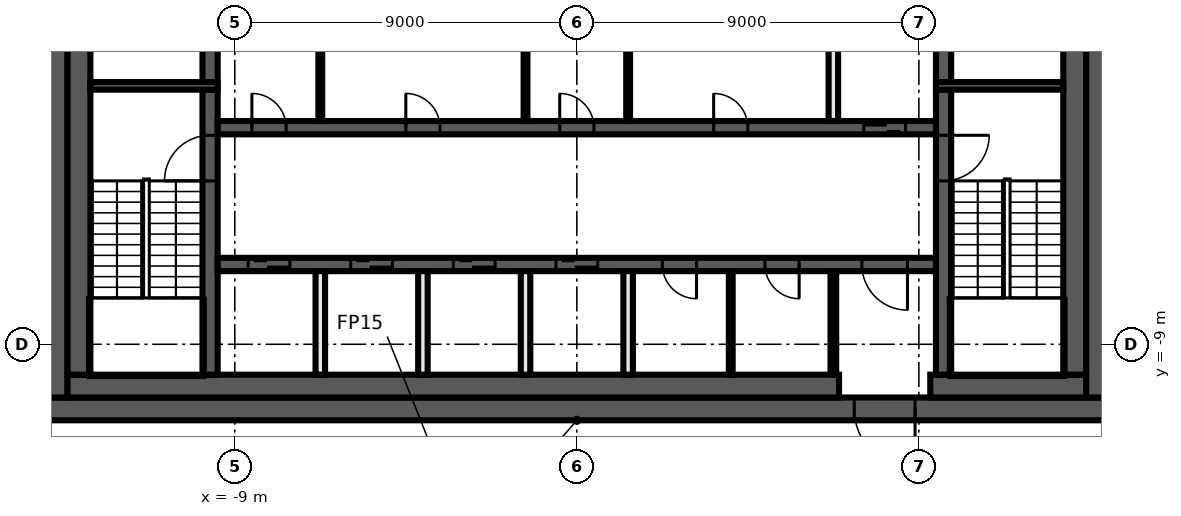
"""IFC4 building model, lengths in metres.
Left out: names, types, materials, properties, quantities, classifications, styles, units other than length and angle.
Written with IfcOpenShell. Run it as: python <this file> out.ifc"""

import sys

from ifc_helpers import new_model, si_unit, direction, frame, frame_2d, origin, place, context, subcontext, project, spatial, rectangle, extrude, element, fill, save


model = new_model("IFC4")
c1 = context("Model", 3, precision=1e-05, world=origin(), true_north=direction((0.0, 1.0)))
c2 = subcontext(c1, "Body", "Model", "MODEL_VIEW")
j1 = project(units=[si_unit("LENGTHUNIT", "METRE"), si_unit("PLANEANGLEUNIT", "RADIAN")], contexts=[c1])
p1 = place(None, origin())
s1 = spatial("IfcSite", under=j1, at=p1, CompositionType="ELEMENT")
p2 = place(p1, origin())
s2 = spatial("IfcBuilding", under=s1, at=p2, CompositionType="ELEMENT")
p3 = place(p2, frame((0.0, 0.0, 340.4)))
s3 = spatial("IfcBuildingStorey", under=s2, at=p3, CompositionType="ELEMENT", Elevation=340.4)
p4 = place(p3, frame((14.0, -10.7, 0.0), z_axis=(0.0, 0.0, 1.0), x_axis=(-1.0, 0.0, 0.0)))
e1 = element("IfcWall", 1, at=p4, inside=s3, PredefinedType="SHEAR", context=c2, shape_type="SweptSolid", body=[
    extrude(rectangle(XDim=28.0, YDim=0.6, at=frame_2d((14.0, 0.0))), origin(), (0.0, 0.0, 1.0), 3.82),
])
p5 = place(p4, frame((5.1, 0.0, 0.0)))
e2 = element("IfcOpeningElement", 2, at=p5, cuts=e1, PredefinedType="OPENING", context=c2, shape_type="SweptSolid", body=[
    extrude(rectangle(XDim=1.6, YDim=2.1, at=frame_2d((0.8, 1.05))), frame((0.0, 0.31, 0.0), z_axis=(0.0, -1.0, 0.0), x_axis=(1.0, 0.0, 0.0)), (0.0, 0.0, 1.0), 0.62),
])
for number, where, z_axis, x_axis in (
    (3, (13.7, 10.4, 0.0), (0.0, 0.0, 1.0), (0.0, -1.0, 0.0)),
    (4, (-13.7, -10.4, 0.0), (0.0, 0.0, 1.0), (0.0, 1.0, 0.0)),
):
    element("IfcWall", number, at=place(p3, frame(where, z_axis=z_axis, x_axis=x_axis)), inside=s3, PredefinedType="SHEAR", context=c2, shape_type="SweptSolid", body=[
        extrude(rectangle(XDim=20.8, YDim=0.6, at=frame_2d((10.4, 0.0))), origin(), (0.0, 0.0, 1.0), 3.82),
    ])
p6 = place(p3, frame((13.4, -10.1, 0.0), z_axis=(0.0, 0.0, 1.0), x_axis=(-1.0, 0.0, 0.0)))
e5 = element("IfcWall", 5, at=p6, inside=s3, PredefinedType="SHEAR", context=c2, shape_type="SweptSolid", body=[
    extrude(rectangle(XDim=4.1, YDim=0.6, at=frame_2d((2.05, 0.0))), origin(), (0.0, 0.0, 1.0), 3.82),
])
p7 = place(p3, frame((6.9, -10.1, 0.0), z_axis=(0.0, 0.0, 1.0), x_axis=(-1.0, 0.0, 0.0)))
e6 = element("IfcWall", 6, at=p7, inside=s3, PredefinedType="SHEAR", context=c2, shape_type="SweptSolid", body=[
    extrude(rectangle(XDim=20.3, YDim=0.6, at=frame_2d((10.15, 0.0))), origin(), (0.0, 0.0, 1.0), 3.82),
])
for number, where, z_axis, x_axis in (
    (7, (13.1, 9.8, 0.0), (0.0, 0.0, 1.0), (0.0, -1.0, 0.0)),
    (8, (-13.1, -9.8, 0.0), (0.0, 0.0, 1.0), (0.0, 1.0, 0.0)),
):
    element("IfcWall", number, at=place(p3, frame(where, z_axis=z_axis, x_axis=x_axis)), inside=s3, PredefinedType="SHEAR", context=c2, shape_type="SweptSolid", body=[
        extrude(rectangle(XDim=19.6, YDim=0.6, at=frame_2d((9.8, 0.0))), origin(), (0.0, 0.0, 1.0), 3.82),
    ])
p8 = place(p3, frame((9.65, -2.3, 0.0), z_axis=(0.0, 0.0, 1.0), x_axis=(0.0, -1.0, 0.0)))
e9 = element("IfcWall", 9, at=p8, inside=s3, PredefinedType="SHEAR", context=c2, shape_type="SweptSolid", body=[
    extrude(rectangle(XDim=7.5, YDim=0.4, at=frame_2d((3.75, 0.0))), origin(), (0.0, 0.0, 1.0), 3.82),
])
p9 = place(p8, frame((1.2, 0.0, 0.0)))
e10 = element("IfcOpeningElement", 10, at=p9, cuts=e9, PredefinedType="OPENING", context=c2, shape_type="SweptSolid", body=[
    extrude(rectangle(XDim=1.2, YDim=2.1, at=frame_2d((0.6, 1.05))), frame((0.0, 0.21, 0.0), z_axis=(0.0, -1.0, 0.0), x_axis=(1.0, 0.0, 0.0)), (0.0, 0.0, 1.0), 0.42),
])
p10 = place(p3, frame((9.65, 2.1, 0.0), z_axis=(0.0, 0.0, 1.0), x_axis=(0.0, -1.0, 0.0)))
e11 = element("IfcWall", 11, at=p10, inside=s3, PredefinedType="SHEAR", context=c2, shape_type="SweptSolid", body=[
    extrude(rectangle(XDim=4.2, YDim=0.4, at=frame_2d((2.1, 0.0))), origin(), (0.0, 0.0, 1.0), 3.82),
])
p11 = place(p10, frame((0.15, 0.0, 0.0)))
e12 = element("IfcOpeningElement", 12, at=p11, cuts=e11, PredefinedType="OPENING", context=c2, shape_type="SweptSolid", body=[
    extrude(rectangle(XDim=0.9, YDim=2.1, at=frame_2d((0.45, 1.05))), frame((0.0, 0.21, 0.0), z_axis=(0.0, -1.0, 0.0), x_axis=(1.0, 0.0, 0.0)), (0.0, 0.0, 1.0), 0.42),
])
p12 = place(p3, frame((-9.65, -9.8, 0.0), z_axis=(0.0, 0.0, 1.0), x_axis=(0.0, 1.0, 0.0)))
e13 = element("IfcWall", 13, at=p12, inside=s3, PredefinedType="SHEAR", context=c2, shape_type="SweptSolid", body=[
    extrude(rectangle(XDim=7.5, YDim=0.4, at=frame_2d((3.75, 0.0))), origin(), (0.0, 0.0, 1.0), 3.82),
])
p13 = place(p12, frame((5.1, 0.0, 0.0)))
e14 = element("IfcOpeningElement", 14, at=p13, cuts=e13, PredefinedType="OPENING", context=c2, shape_type="SweptSolid", body=[
    extrude(rectangle(XDim=1.2, YDim=2.1, at=frame_2d((0.6, 1.05))), frame((0.0, 0.21, 0.0), z_axis=(0.0, -1.0, 0.0), x_axis=(1.0, 0.0, 0.0)), (0.0, 0.0, 1.0), 0.42),
])
p14 = place(p3, frame((-9.65, -2.1, 0.0), z_axis=(0.0, 0.0, 1.0), x_axis=(0.0, 1.0, 0.0)))
e15 = element("IfcWall", 15, at=p14, inside=s3, PredefinedType="SHEAR", context=c2, shape_type="SweptSolid", body=[
    extrude(rectangle(XDim=4.2, YDim=0.4, at=frame_2d((2.1, 0.0))), origin(), (0.0, 0.0, 1.0), 3.82),
])
for number, where, z_axis, x_axis in (
    (16, (9.45, -2.2, 0.0), (0.0, 0.0, 1.0), (1.0, 0.0, 0.0)),
    (17, (-9.45, -2.2, 0.0), (0.0, 0.0, 1.0), (-1.0, 0.0, 0.0)),
):
    element("IfcWall", number, at=place(p3, frame(where, z_axis=z_axis, x_axis=x_axis)), inside=s3, PredefinedType="SHEAR", context=c2, shape_type="SweptSolid", body=[
        extrude(rectangle(XDim=3.35, YDim=0.2, at=frame_2d((1.675, 0.0))), origin(), (0.0, 0.0, 1.0), 3.82),
    ])
p15 = place(p3, frame((-9.45, -3.3, 0.0), z_axis=(0.0, 0.0, 1.0), x_axis=(1.0, 0.0, 0.0)))
e18 = element("IfcWall", 18, at=p15, inside=s3, PredefinedType="SHEAR", context=c2, shape_type="SweptSolid", body=[
    extrude(rectangle(XDim=18.9, YDim=0.35, at=frame_2d((9.45, 0.0))), origin(), (0.0, 0.0, 1.0), 3.82),
])
p16 = place(p15, frame((17.0, 0.0, 0.0)))
e19 = element("IfcOpeningElement", 19, at=p16, cuts=e18, PredefinedType="OPENING", context=c2, shape_type="SweptSolid", body=[
    extrude(rectangle(XDim=1.1, YDim=2.1, at=frame_2d((0.55, 1.05))), frame((0.0, 0.185, 0.0), z_axis=(0.0, -1.0, 0.0), x_axis=(1.0, 0.0, 0.0)), (0.0, 0.0, 1.0), 0.37),
])
p17 = place(p15, frame((0.9, 0.0, 0.0)))
e20 = element("IfcOpeningElement", 20, at=p17, cuts=e18, PredefinedType="OPENING", context=c2, shape_type="SweptSolid", body=[
    extrude(rectangle(XDim=0.9, YDim=2.1, at=frame_2d((0.45, 1.05))), frame((0.0, 0.185, 0.0), z_axis=(0.0, -1.0, 0.0), x_axis=(1.0, 0.0, 0.0)), (0.0, 0.0, 1.0), 0.37),
])
p18 = place(p15, frame((4.95, 0.0, 0.0)))
e21 = element("IfcOpeningElement", 21, at=p18, cuts=e18, PredefinedType="OPENING", context=c2, shape_type="SweptSolid", body=[
    extrude(rectangle(XDim=0.9, YDim=2.1, at=frame_2d((0.45, 1.05))), frame((0.0, 0.185, 0.0), z_axis=(0.0, -1.0, 0.0), x_axis=(1.0, 0.0, 0.0)), (0.0, 0.0, 1.0), 0.37),
])
p19 = place(p15, frame((9.0, 0.0, 0.0)))
e22 = element("IfcOpeningElement", 22, at=p19, cuts=e18, PredefinedType="OPENING", context=c2, shape_type="SweptSolid", body=[
    extrude(rectangle(XDim=0.9, YDim=2.1, at=frame_2d((0.45, 1.05))), frame((0.0, 0.185, 0.0), z_axis=(0.0, -1.0, 0.0), x_axis=(1.0, 0.0, 0.0)), (0.0, 0.0, 1.0), 0.37),
])
p20 = place(p15, frame((13.05, 0.0, 0.0)))
e23 = element("IfcOpeningElement", 23, at=p20, cuts=e18, PredefinedType="OPENING", context=c2, shape_type="SweptSolid", body=[
    extrude(rectangle(XDim=0.9, YDim=2.1, at=frame_2d((0.45, 1.05))), frame((0.0, 0.185, 0.0), z_axis=(0.0, -1.0, 0.0), x_axis=(1.0, 0.0, 0.0)), (0.0, 0.0, 1.0), 0.37),
])
p21 = place(p3, frame((9.45, -6.9, 0.0), z_axis=(0.0, 0.0, 1.0), x_axis=(-1.0, 0.0, 0.0)))
e24 = element("IfcWall", 24, at=p21, inside=s3, PredefinedType="SHEAR", context=c2, shape_type="SweptSolid", body=[
    extrude(rectangle(XDim=18.9, YDim=0.35, at=frame_2d((9.45, 0.0))), origin(), (0.0, 0.0, 1.0), 3.82),
])
p22 = place(p21, frame((17.0, 0.0, 0.0)))
e25 = element("IfcOpeningElement", 25, at=p22, cuts=e24, PredefinedType="OPENING", context=c2, shape_type="SweptSolid", body=[
    extrude(rectangle(XDim=1.1, YDim=2.1, at=frame_2d((0.55, 1.05))), frame((0.0, 0.185, 0.0), z_axis=(0.0, -1.0, 0.0), x_axis=(1.0, 0.0, 0.0)), (0.0, 0.0, 1.0), 0.37),
])
p23 = place(p21, frame((14.3, 0.0, 0.0)))
e26 = element("IfcOpeningElement", 26, at=p23, cuts=e24, PredefinedType="OPENING", context=c2, shape_type="SweptSolid", body=[
    extrude(rectangle(XDim=1.1, YDim=2.1, at=frame_2d((0.55, 1.05))), frame((0.0, 0.185, 0.0), z_axis=(0.0, -1.0, 0.0), x_axis=(1.0, 0.0, 0.0)), (0.0, 0.0, 1.0), 0.37),
])
p24 = place(p21, frame((11.6, 0.0, 0.0)))
e27 = element("IfcOpeningElement", 27, at=p24, cuts=e24, PredefinedType="OPENING", context=c2, shape_type="SweptSolid", body=[
    extrude(rectangle(XDim=1.1, YDim=2.1, at=frame_2d((0.55, 1.05))), frame((0.0, 0.185, 0.0), z_axis=(0.0, -1.0, 0.0), x_axis=(1.0, 0.0, 0.0)), (0.0, 0.0, 1.0), 0.37),
])
p25 = place(p21, frame((8.9, 0.0, 0.0)))
e28 = element("IfcOpeningElement", 28, at=p25, cuts=e24, PredefinedType="OPENING", context=c2, shape_type="SweptSolid", body=[
    extrude(rectangle(XDim=1.1, YDim=2.1, at=frame_2d((0.55, 1.05))), frame((0.0, 0.185, 0.0), z_axis=(0.0, -1.0, 0.0), x_axis=(1.0, 0.0, 0.0)), (0.0, 0.0, 1.0), 0.37),
])
p26 = place(p21, frame((0.75, 0.0, 0.0)))
e29 = element("IfcOpeningElement", 29, at=p26, cuts=e24, PredefinedType="OPENING", context=c2, shape_type="SweptSolid", body=[
    extrude(rectangle(XDim=1.2, YDim=2.1, at=frame_2d((0.6, 1.05))), frame((0.0, 0.185, 0.0), z_axis=(0.0, -1.0, 0.0), x_axis=(1.0, 0.0, 0.0)), (0.0, 0.0, 1.0), 0.37),
])
p27 = place(p21, frame((6.3, 0.0, 0.0)))
e30 = element("IfcOpeningElement", 30, at=p27, cuts=e24, PredefinedType="OPENING", context=c2, shape_type="SweptSolid", body=[
    extrude(rectangle(XDim=0.9, YDim=2.1, at=frame_2d((0.45, 1.05))), frame((0.0, 0.185, 0.0), z_axis=(0.0, -1.0, 0.0), x_axis=(1.0, 0.0, 0.0)), (0.0, 0.0, 1.0), 0.37),
])
p28 = place(p21, frame((3.6, 0.0, 0.0)))
e31 = element("IfcOpeningElement", 31, at=p28, cuts=e24, PredefinedType="OPENING", context=c2, shape_type="SweptSolid", body=[
    extrude(rectangle(XDim=0.9, YDim=2.1, at=frame_2d((0.45, 1.05))), frame((0.0, 0.185, 0.0), z_axis=(0.0, -1.0, 0.0), x_axis=(1.0, 0.0, 0.0)), (0.0, 0.0, 1.0), 0.37),
])
p29 = place(p3, frame((6.75, -9.8, 0.0), z_axis=(0.0, 0.0, 1.0), x_axis=(0.0, 1.0, 0.0)))
e32 = element("IfcWall", 32, at=p29, inside=s3, PredefinedType="PARTITIONING", context=c2, shape_type="SweptSolid", body=[
    extrude(rectangle(XDim=2.725, YDim=0.15, at=frame_2d((1.363, 0.0))), origin(), (0.0, 0.0, 1.0), 3.82),
])
p30 = place(p3, frame((6.75, -3.125, 0.0), z_axis=(0.0, 0.0, 1.0), x_axis=(0.0, 1.0, 0.0)))
e33 = element("IfcWall", 33, at=p30, inside=s3, PredefinedType="SOLIDWALL", context=c2, shape_type="SweptSolid", body=[
    extrude(rectangle(XDim=2.725, YDim=0.25, at=frame_2d((1.363, 0.0))), origin(), (0.0, 0.0, 1.0), 3.82),
])
for number, where, z_axis, x_axis in (
    (34, (4.05, -9.8, 0.0), (0.0, 0.0, 1.0), (0.0, 1.0, 0.0)),
    (35, (1.35, -3.125, 0.0), (0.0, 0.0, 1.0), (0.0, 1.0, 0.0)),
):
    element("IfcWall", number, at=place(p3, frame(where, z_axis=z_axis, x_axis=x_axis)), inside=s3, PredefinedType="PARTITIONING", context=c2, shape_type="SweptSolid", body=[
        extrude(rectangle(XDim=2.725, YDim=0.1, at=frame_2d((1.363, 0.0))), origin(), (0.0, 0.0, 1.0), 3.82),
    ])
p31 = place(p3, frame((1.35, -9.8, 0.0), z_axis=(0.0, 0.0, 1.0), x_axis=(0.0, 1.0, 0.0)))
e36 = element("IfcWall", 36, at=p31, inside=s3, PredefinedType="SOLIDWALL", context=c2, shape_type="SweptSolid", body=[
    extrude(rectangle(XDim=2.725, YDim=0.25, at=frame_2d((1.363, 0.0))), origin(), (0.0, 0.0, 1.0), 3.82),
])
p32 = place(p3, frame((-1.35, -3.125, 0.0), z_axis=(0.0, 0.0, 1.0), x_axis=(0.0, 1.0, 0.0)))
e37 = element("IfcWall", 37, at=p32, inside=s3, PredefinedType="PARTITIONING", context=c2, shape_type="SweptSolid", body=[
    extrude(rectangle(XDim=2.725, YDim=0.1, at=frame_2d((1.363, 0.0))), origin(), (0.0, 0.0, 1.0), 3.82),
])
for number, where, z_axis, x_axis in (
    (38, (-1.35, -9.8, 0.0), (0.0, 0.0, 1.0), (0.0, 1.0, 0.0)),
    (39, (-4.05, -9.8, 0.0), (0.0, 0.0, 1.0), (0.0, 1.0, 0.0)),
):
    element("IfcWall", number, at=place(p3, frame(where, z_axis=z_axis, x_axis=x_axis)), inside=s3, PredefinedType="SOLIDWALL", context=c2, shape_type="SweptSolid", body=[
        extrude(rectangle(XDim=2.725, YDim=0.25, at=frame_2d((1.363, 0.0))), origin(), (0.0, 0.0, 1.0), 3.82),
    ])
p33 = place(p3, frame((-6.75, -3.125, 0.0), z_axis=(0.0, 0.0, 1.0), x_axis=(0.0, 1.0, 0.0)))
e40 = element("IfcWall", 40, at=p33, inside=s3, PredefinedType="PARTITIONING", context=c2, shape_type="SweptSolid", body=[
    extrude(rectangle(XDim=2.725, YDim=0.1, at=frame_2d((1.363, 0.0))), origin(), (0.0, 0.0, 1.0), 3.82),
])
p34 = place(p3, frame((-6.75, -9.8, 0.0), z_axis=(0.0, 0.0, 1.0), x_axis=(0.0, 1.0, 0.0)))
e41 = element("IfcWall", 41, at=p34, inside=s3, PredefinedType="SOLIDWALL", context=c2, shape_type="SweptSolid", body=[
    extrude(rectangle(XDim=2.725, YDim=0.25, at=frame_2d((1.363, 0.0))), origin(), (0.0, 0.0, 1.0), 3.82),
])
p35 = place(p16, origin())
e42 = element("IfcDoor", 42, at=p35, inside=s3, OperationType="DOUBLE_DOOR_SLIDING", PredefinedType="DOOR", context=c2, shape_type="SweptSolid", body=[
    extrude(rectangle(XDim=1.1, YDim=2.1, at=frame_2d((0.55, 1.05))), frame((0.0, 0.025, 0.0), z_axis=(0.0, -1.0, 0.0), x_axis=(1.0, 0.0, 0.0)), (0.0, 0.0, 1.0), 0.05),
])
fill(e19, e42)
p36 = place(p22, origin())
e43 = element("IfcDoor", 43, at=p36, inside=s3, OperationType="DOUBLE_DOOR_SLIDING", PredefinedType="DOOR", context=c2, shape_type="SweptSolid", body=[
    extrude(rectangle(XDim=1.1, YDim=2.1, at=frame_2d((0.55, 1.05))), frame((0.0, 0.025, 0.0), z_axis=(0.0, -1.0, 0.0), x_axis=(1.0, 0.0, 0.0)), (0.0, 0.0, 1.0), 0.05),
])
fill(e25, e43)
p37 = place(p23, origin())
e44 = element("IfcDoor", 44, at=p37, inside=s3, OperationType="DOUBLE_DOOR_SLIDING", PredefinedType="DOOR", context=c2, shape_type="SweptSolid", body=[
    extrude(rectangle(XDim=1.1, YDim=2.1, at=frame_2d((0.55, 1.05))), frame((0.0, 0.025, 0.0), z_axis=(0.0, -1.0, 0.0), x_axis=(1.0, 0.0, 0.0)), (0.0, 0.0, 1.0), 0.05),
])
fill(e26, e44)
p38 = place(p24, origin())
e45 = element("IfcDoor", 45, at=p38, inside=s3, OperationType="DOUBLE_DOOR_SLIDING", PredefinedType="DOOR", context=c2, shape_type="SweptSolid", body=[
    extrude(rectangle(XDim=1.1, YDim=2.1, at=frame_2d((0.55, 1.05))), frame((0.0, 0.025, 0.0), z_axis=(0.0, -1.0, 0.0), x_axis=(1.0, 0.0, 0.0)), (0.0, 0.0, 1.0), 0.05),
])
fill(e27, e45)
p39 = place(p25, origin())
e46 = element("IfcDoor", 46, at=p39, inside=s3, OperationType="DOUBLE_DOOR_SLIDING", PredefinedType="DOOR", context=c2, shape_type="SweptSolid", body=[
    extrude(rectangle(XDim=1.1, YDim=2.1, at=frame_2d((0.55, 1.05))), frame((0.0, 0.025, 0.0), z_axis=(0.0, -1.0, 0.0), x_axis=(1.0, 0.0, 0.0)), (0.0, 0.0, 1.0), 0.05),
])
fill(e28, e46)
p40 = place(p5, origin())
e47 = element("IfcDoor", 47, at=p40, inside=s3, OperationType="DOUBLE_DOOR_SINGLE_SWING", PredefinedType="DOOR", context=c2, shape_type="SweptSolid", body=[
    extrude(rectangle(XDim=1.6, YDim=2.1, at=frame_2d((0.8, 1.05))), frame((0.0, 0.025, 0.0), z_axis=(0.0, -1.0, 0.0), x_axis=(1.0, 0.0, 0.0)), (0.0, 0.0, 1.0), 0.05),
])
fill(e2, e47)
p41 = place(p26, origin())
e48 = element("IfcDoor", 48, at=p41, inside=s3, OperationType="SINGLE_SWING_LEFT", PredefinedType="DOOR", context=c2, shape_type="SweptSolid", body=[
    extrude(rectangle(XDim=1.2, YDim=2.1, at=frame_2d((0.6, 1.05))), frame((0.0, 0.025, 0.0), z_axis=(0.0, -1.0, 0.0), x_axis=(1.0, 0.0, 0.0)), (0.0, 0.0, 1.0), 0.05),
])
fill(e29, e48)
p42 = place(p17, origin())
e49 = element("IfcDoor", 49, at=p42, inside=s3, OperationType="SINGLE_SWING_RIGHT", PredefinedType="DOOR", context=c2, shape_type="SweptSolid", body=[
    extrude(rectangle(XDim=0.9, YDim=2.1, at=frame_2d((0.45, 1.05))), frame((0.0, 0.025, 0.0), z_axis=(0.0, -1.0, 0.0), x_axis=(1.0, 0.0, 0.0)), (0.0, 0.0, 1.0), 0.05),
])
fill(e20, e49)
p43 = place(p18, origin())
e50 = element("IfcDoor", 50, at=p43, inside=s3, OperationType="SINGLE_SWING_LEFT", PredefinedType="DOOR", context=c2, shape_type="SweptSolid", body=[
    extrude(rectangle(XDim=0.9, YDim=2.1, at=frame_2d((0.45, 1.05))), frame((0.0, 0.025, 0.0), z_axis=(0.0, -1.0, 0.0), x_axis=(1.0, 0.0, 0.0)), (0.0, 0.0, 1.0), 0.05),
])
fill(e21, e50)
p44 = place(p19, origin())
e51 = element("IfcDoor", 51, at=p44, inside=s3, OperationType="SINGLE_SWING_RIGHT", PredefinedType="DOOR", context=c2, shape_type="SweptSolid", body=[
    extrude(rectangle(XDim=0.9, YDim=2.1, at=frame_2d((0.45, 1.05))), frame((0.0, 0.025, 0.0), z_axis=(0.0, -1.0, 0.0), x_axis=(1.0, 0.0, 0.0)), (0.0, 0.0, 1.0), 0.05),
])
fill(e22, e51)
p45 = place(p20, origin())
e52 = element("IfcDoor", 52, at=p45, inside=s3, OperationType="SINGLE_SWING_LEFT", PredefinedType="DOOR", context=c2, shape_type="SweptSolid", body=[
    extrude(rectangle(XDim=0.9, YDim=2.1, at=frame_2d((0.45, 1.05))), frame((0.0, 0.025, 0.0), z_axis=(0.0, -1.0, 0.0), x_axis=(1.0, 0.0, 0.0)), (0.0, 0.0, 1.0), 0.05),
])
fill(e23, e52)
p46 = place(p27, origin())
e53 = element("IfcDoor", 53, at=p46, inside=s3, OperationType="SINGLE_SWING_RIGHT", PredefinedType="DOOR", context=c2, shape_type="SweptSolid", body=[
    extrude(rectangle(XDim=0.9, YDim=2.1, at=frame_2d((0.45, 1.05))), frame((0.0, 0.025, 0.0), z_axis=(0.0, -1.0, 0.0), x_axis=(1.0, 0.0, 0.0)), (0.0, 0.0, 1.0), 0.05),
])
fill(e30, e53)
p47 = place(p28, origin())
e54 = element("IfcDoor", 54, at=p47, inside=s3, OperationType="SINGLE_SWING_LEFT", PredefinedType="DOOR", context=c2, shape_type="SweptSolid", body=[
    extrude(rectangle(XDim=0.9, YDim=2.1, at=frame_2d((0.45, 1.05))), frame((0.0, 0.025, 0.0), z_axis=(0.0, -1.0, 0.0), x_axis=(1.0, 0.0, 0.0)), (0.0, 0.0, 1.0), 0.05),
])
fill(e31, e54)
p48 = place(p9, origin())
e55 = element("IfcDoor", 55, at=p48, inside=s3, OperationType="SINGLE_SWING_RIGHT", PredefinedType="DOOR", context=c2, shape_type="SweptSolid", body=[
    extrude(rectangle(XDim=1.2, YDim=2.1, at=frame_2d((0.6, 1.05))), frame((0.0, 0.025, 0.0), z_axis=(0.0, -1.0, 0.0), x_axis=(1.0, 0.0, 0.0)), (0.0, 0.0, 1.0), 0.05),
])
fill(e10, e55)
p49 = place(p13, origin())
e56 = element("IfcDoor", 56, at=p49, inside=s3, OperationType="SINGLE_SWING_LEFT", PredefinedType="DOOR", context=c2, shape_type="SweptSolid", body=[
    extrude(rectangle(XDim=1.2, YDim=2.1, at=frame_2d((0.6, 1.05))), frame((0.0, 0.025, 0.0), z_axis=(0.0, -1.0, 0.0), x_axis=(1.0, 0.0, 0.0)), (0.0, 0.0, 1.0), 0.05),
])
fill(e14, e56)
save(model, sys.argv[1])
